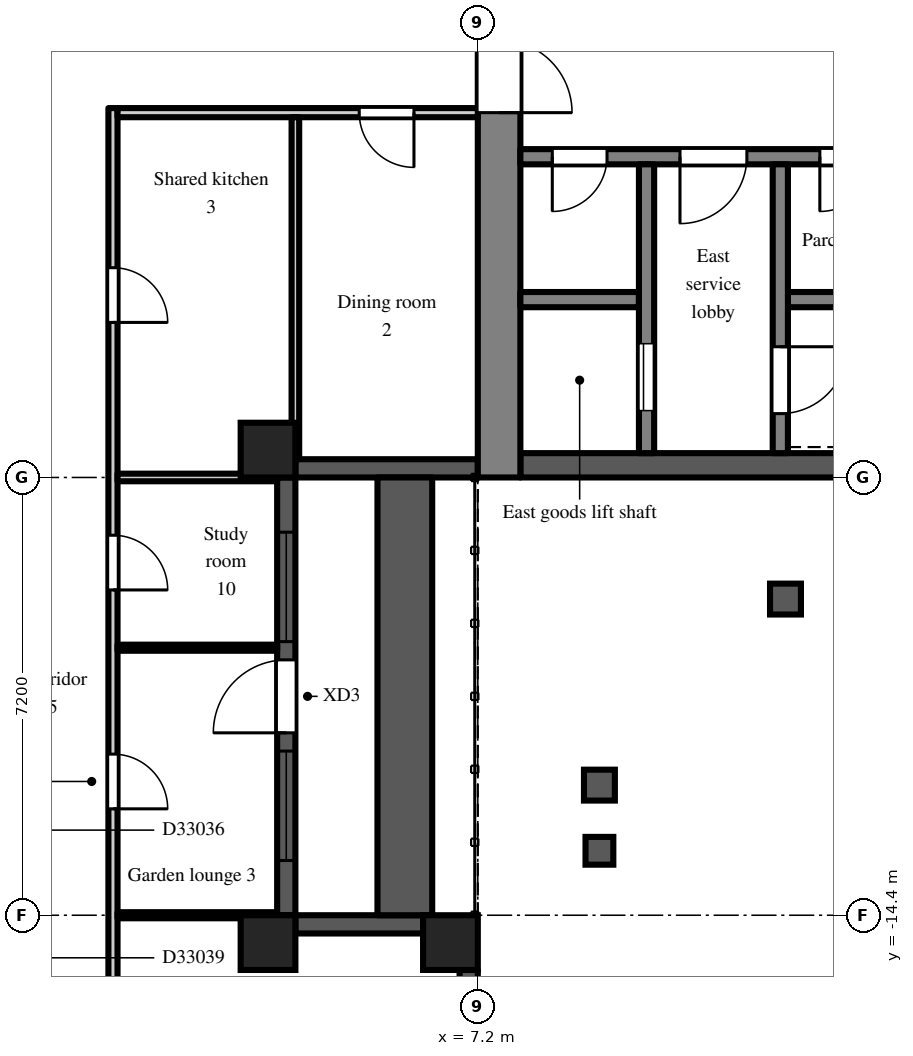
"""IFC4 building model, lengths in metres.
Left out: names, types, materials, properties, quantities, classifications, styles, units other than length and angle.
Written with IfcOpenShell. Run it as: python <this file> out.ifc"""

import sys

from ifc_helpers import new_model, si_unit, direction, frame, frame_2d, origin, origin_2d, place, context, subcontext, project, spatial, rectangle, extrude, element, fill, save


model = new_model("IFC4")
c1 = context("Model", 3, precision=1e-05, world=origin(), true_north=direction((0.0, 1.0)))
c2 = subcontext(c1, "Body", "Model", "MODEL_VIEW")
j1 = project(units=[si_unit("LENGTHUNIT", "METRE"), si_unit("PLANEANGLEUNIT", "RADIAN")], contexts=[c1])
p1 = place(None, origin())
s1 = spatial("IfcSite", under=j1, at=p1, CompositionType="ELEMENT")
p2 = place(p1, origin())
s2 = spatial("IfcBuilding", under=s1, at=p2, CompositionType="ELEMENT")
p3 = place(p2, frame((0.0, 0.0, 231.9)))
s3 = spatial("IfcBuildingStorey", under=s2, at=p3, CompositionType="ELEMENT", Elevation=231.9)
for number, where, z_axis, x_axis in (
    (1, (3.75, -14.85, 0.0), (0.0, 0.0, 1.0), (1.0, 0.0, 0.0)),
    (2, (3.75, -6.75, 0.0), (0.0, 0.0, 1.0), (1.0, 0.0, 0.0)),
    (3, (6.75, -14.85, 0.0), (0.0, 0.0, 1.0), (1.0, 0.0, 0.0)),
):
    element("IfcColumn", number, at=place(p3, frame(where, z_axis=z_axis, x_axis=x_axis)), inside=s3, PredefinedType="COLUMN", context=c2, shape_type="SweptSolid", body=[
        extrude(rectangle(XDim=0.9, YDim=0.9, at=origin_2d()), origin(), (0.0, 0.0, 1.0), 3.0),
    ])
p4 = place(p3, frame((7.05, -17.1, 0.0), z_axis=(0.0, 0.0, 1.0), x_axis=(0.0, 1.0, 0.0)))
e4 = element("IfcWall", 4, at=p4, inside=s3, PredefinedType="SOLIDWALL", context=c2, shape_type="SweptSolid", body=[
    extrude(rectangle(XDim=1.8, YDim=0.3, at=frame_2d((0.9, 0.0))), origin(), (0.0, 0.0, 1.0), 2.3),
])
p5 = place(p4, frame((0.3, 0.0, 0.2)))
e5 = element("IfcOpeningElement", 5, at=p5, cuts=e4, PredefinedType="OPENING", context=c2, shape_type="SweptSolid", body=[
    extrude(rectangle(XDim=1.2, YDim=1.85, at=frame_2d((0.6, 0.925))), frame((0.0, 0.16, 0.0), z_axis=(0.0, -1.0, 0.0), x_axis=(1.0, 0.0, 0.0)), (0.0, 0.0, 1.0), 0.32),
])
p6 = place(p3, frame((6.3, -14.55, 0.0), z_axis=(0.0, 0.0, 1.0), x_axis=(-1.0, 0.0, 0.0)))
e6 = element("IfcWall", 6, at=p6, inside=s3, PredefinedType="SOLIDWALL", context=c2, shape_type="SweptSolid", body=[
    extrude(rectangle(XDim=2.1, YDim=0.3, at=frame_2d((1.05, 0.0))), origin(), (0.0, 0.0, 1.0), 2.3),
])
p7 = place(p3, frame((4.05, -14.4, 0.0), z_axis=(0.0, 0.0, 1.0), x_axis=(0.0, 1.0, 0.0)))
e7 = element("IfcWall", 7, at=p7, inside=s3, PredefinedType="SOLIDWALL", context=c2, shape_type="SweptSolid", body=[
    extrude(rectangle(XDim=7.2, YDim=0.3, at=frame_2d((3.6, 0.0))), origin(), (0.0, 0.0, 1.0), 2.3),
])
p8 = place(p7, frame((3.0, 0.0, 0.0)))
e8 = element("IfcOpeningElement", 8, at=p8, cuts=e7, PredefinedType="OPENING", context=c2, shape_type="SweptSolid", body=[
    extrude(rectangle(XDim=1.2, YDim=2.05, at=frame_2d((0.6, 1.025))), frame((0.0, 0.16, 0.0), z_axis=(0.0, -1.0, 0.0), x_axis=(1.0, 0.0, 0.0)), (0.0, 0.0, 1.0), 0.32),
])
p9 = place(p7, frame((0.9, 0.0, 0.2)))
e9 = element("IfcOpeningElement", 9, at=p9, cuts=e7, PredefinedType="OPENING", context=c2, shape_type="SweptSolid", body=[
    extrude(rectangle(XDim=1.8, YDim=1.85, at=frame_2d((0.9, 0.925))), frame((0.0, 0.16, 0.0), z_axis=(0.0, -1.0, 0.0), x_axis=(1.0, 0.0, 0.0)), (0.0, 0.0, 1.0), 0.32),
])
p10 = place(p7, frame((4.5, 0.0, 0.2)))
e10 = element("IfcOpeningElement", 10, at=p10, cuts=e7, PredefinedType="OPENING", context=c2, shape_type="SweptSolid", body=[
    extrude(rectangle(XDim=1.8, YDim=1.85, at=frame_2d((0.9, 0.925))), frame((0.0, 0.16, 0.0), z_axis=(0.0, -1.0, 0.0), x_axis=(1.0, 0.0, 0.0)), (0.0, 0.0, 1.0), 0.32),
])
p11 = place(p3, frame((4.2, -7.05, 0.0), z_axis=(0.0, 0.0, 1.0), x_axis=(1.0, 0.0, 0.0)))
e11 = element("IfcWall", 11, at=p11, inside=s3, PredefinedType="SOLIDWALL", context=c2, shape_type="SweptSolid", body=[
    extrude(rectangle(XDim=3.0, YDim=0.3, at=frame_2d((1.5, 0.0))), origin(), (0.0, 0.0, 1.0), 2.3),
])
p12 = place(p3, frame((6.0, -14.4, 0.0), z_axis=(0.0, 0.0, 1.0), x_axis=(0.0, 1.0, 0.0)))
e12 = element("IfcWall", 12, at=p12, inside=s3, PredefinedType="PARAPET", context=c2, shape_type="SweptSolid", body=[
    extrude(rectangle(XDim=7.2, YDim=0.9, at=frame_2d((3.6, 0.0))), origin(), (0.0, 0.0, 1.0), 0.8),
])
p13 = place(p3, frame((7.55, -7.2, 0.0), z_axis=(0.0, 0.0, 1.0), x_axis=(0.0, 1.0, 0.0)))
e13 = element("IfcWall", 13, at=p13, inside=s3, PredefinedType="SHEAR", context=c2, shape_type="SweptSolid", body=[
    extrude(rectangle(XDim=14.4, YDim=0.7, at=frame_2d((7.2, 0.0))), origin(), (0.0, 0.0, 1.0), 2.6),
])
p14 = place(p13, frame((6.0, 0.0, 0.0)))
e14 = element("IfcOpeningElement", 14, at=p14, cuts=e13, PredefinedType="OPENING", context=c2, shape_type="SweptSolid", body=[
    extrude(rectangle(XDim=2.4, YDim=2.2, at=frame_2d((1.2, 1.1))), frame((0.0, 0.36, 0.0), z_axis=(0.0, -1.0, 0.0), x_axis=(1.0, 0.0, 0.0)), (0.0, 0.0, 1.0), 0.72),
])
p15 = place(p3, frame((7.9, -7.0, 0.0), z_axis=(0.0, 0.0, 1.0), x_axis=(1.0, 0.0, 0.0)))
e15 = element("IfcWall", 15, at=p15, inside=s3, PredefinedType="SHEAR", context=c2, shape_type="SweptSolid", body=[
    extrude(rectangle(XDim=12.95, YDim=0.4, at=frame_2d((6.475, 0.0))), origin(), (0.0, 0.0, 1.0), 2.6),
])
p16 = place(p3, frame((7.9, -1.925, 0.0), z_axis=(0.0, 0.0, 1.0), x_axis=(1.0, 0.0, 0.0)))
e16 = element("IfcWall", 16, at=p16, inside=s3, PredefinedType="SHEAR", context=c2, shape_type="SweptSolid", body=[
    extrude(rectangle(XDim=12.95, YDim=0.25, at=frame_2d((6.475, 0.0))), origin(), (0.0, 0.0, 1.0), 2.6),
])
p17 = place(p16, frame((0.525, 0.0, 0.0)))
e17 = element("IfcOpeningElement", 17, at=p17, cuts=e16, PredefinedType="OPENING", context=c2, shape_type="SweptSolid", body=[
    extrude(rectangle(XDim=0.9, YDim=2.1, at=frame_2d((0.45, 1.05))), frame((0.0, 0.135, 0.0), z_axis=(0.0, -1.0, 0.0), x_axis=(1.0, 0.0, 0.0)), (0.0, 0.0, 1.0), 0.27),
])
p18 = place(p16, frame((2.625, 0.0, 0.0)))
e18 = element("IfcOpeningElement", 18, at=p18, cuts=e16, PredefinedType="OPENING", context=c2, shape_type="SweptSolid", body=[
    extrude(rectangle(XDim=1.1, YDim=2.1, at=frame_2d((0.55, 1.05))), frame((0.0, 0.135, 0.0), z_axis=(0.0, -1.0, 0.0), x_axis=(1.0, 0.0, 0.0)), (0.0, 0.0, 1.0), 0.27),
])
p19 = place(p16, frame((4.925, 0.0, 0.0)))
e19 = element("IfcOpeningElement", 19, at=p19, cuts=e16, PredefinedType="OPENING", context=c2, shape_type="SweptSolid", body=[
    extrude(rectangle(XDim=0.9, YDim=2.1, at=frame_2d((0.45, 1.05))), frame((0.0, 0.135, 0.0), z_axis=(0.0, -1.0, 0.0), x_axis=(1.0, 0.0, 0.0)), (0.0, 0.0, 1.0), 0.27),
])
p20 = place(p16, frame((8.225, 0.0, 0.0)))
e20 = element("IfcOpeningElement", 20, at=p20, cuts=e16, PredefinedType="OPENING", context=c2, shape_type="SweptSolid", body=[
    extrude(rectangle(XDim=0.9, YDim=2.1, at=frame_2d((0.45, 1.05))), frame((0.0, 0.135, 0.0), z_axis=(0.0, -1.0, 0.0), x_axis=(1.0, 0.0, 0.0)), (0.0, 0.0, 1.0), 0.27),
])
p21 = place(p16, frame((11.525, 0.0, 0.0)))
e21 = element("IfcOpeningElement", 21, at=p21, cuts=e16, PredefinedType="OPENING", context=c2, shape_type="SweptSolid", body=[
    extrude(rectangle(XDim=0.9, YDim=2.1, at=frame_2d((0.45, 1.05))), frame((0.0, 0.135, 0.0), z_axis=(0.0, -1.0, 0.0), x_axis=(1.0, 0.0, 0.0)), (0.0, 0.0, 1.0), 0.27),
])
p22 = place(p3, frame((7.9, -4.275, 0.0), z_axis=(0.0, 0.0, 1.0), x_axis=(1.0, 0.0, 0.0)))
e22 = element("IfcWall", 22, at=p22, inside=s3, PredefinedType="SHEAR", context=c2, shape_type="SweptSolid", body=[
    extrude(rectangle(XDim=1.95, YDim=0.25, at=frame_2d((0.975, 0.0))), origin(), (0.0, 0.0, 1.0), 2.6),
])
p23 = place(p3, frame((12.3, -4.275, 0.0), z_axis=(0.0, 0.0, 1.0), x_axis=(1.0, 0.0, 0.0)))
e23 = element("IfcWall", 23, at=p23, inside=s3, PredefinedType="SHEAR", context=c2, shape_type="SweptSolid", body=[
    extrude(rectangle(XDim=8.55, YDim=0.25, at=frame_2d((4.275, 0.0))), origin(), (0.0, 0.0, 1.0), 2.6),
])
p24 = place(p3, frame((9.975, -2.05, 0.0), z_axis=(0.0, 0.0, 1.0), x_axis=(0.0, -1.0, 0.0)))
e24 = element("IfcWall", 24, at=p24, inside=s3, PredefinedType="SHEAR", context=c2, shape_type="SweptSolid", body=[
    extrude(rectangle(XDim=4.75, YDim=0.25, at=frame_2d((2.375, 0.0))), origin(), (0.0, 0.0, 1.0), 2.6),
])
p25 = place(p24, frame((2.95, 0.0, 0.0)))
e25 = element("IfcOpeningElement", 25, at=p25, cuts=e24, PredefinedType="OPENING", context=c2, shape_type="SweptSolid", body=[
    extrude(rectangle(XDim=1.1, YDim=2.1, at=frame_2d((0.55, 1.05))), frame((0.0, 0.135, 0.0), z_axis=(0.0, -1.0, 0.0), x_axis=(1.0, 0.0, 0.0)), (0.0, 0.0, 1.0), 0.27),
])
p26 = place(p3, frame((12.175, -2.05, 0.0), z_axis=(0.0, 0.0, 1.0), x_axis=(0.0, -1.0, 0.0)))
e26 = element("IfcWall", 26, at=p26, inside=s3, PredefinedType="SHEAR", context=c2, shape_type="SweptSolid", body=[
    extrude(rectangle(XDim=4.75, YDim=0.25, at=frame_2d((2.375, 0.0))), origin(), (0.0, 0.0, 1.0), 2.6),
])
p27 = place(p26, frame((3.0, 0.0, 0.0)))
e27 = element("IfcOpeningElement", 27, at=p27, cuts=e26, PredefinedType="OPENING", context=c2, shape_type="SweptSolid", body=[
    extrude(rectangle(XDim=1.1, YDim=2.1, at=frame_2d((0.55, 1.05))), frame((0.0, 0.135, 0.0), z_axis=(0.0, -1.0, 0.0), x_axis=(1.0, 0.0, 0.0)), (0.0, 0.0, 1.0), 0.27),
])
p28 = place(p3, frame((1.2, -19.525, 0.0), z_axis=(0.0, 0.0, 1.0), x_axis=(0.0, 1.0, 0.0)))
e28 = element("IfcWall", 28, at=p28, inside=s3, PredefinedType="PARTITIONING", context=c2, shape_type="SweptSolid", body=[
    extrude(rectangle(XDim=18.4, YDim=0.15, at=frame_2d((9.2, 0.0))), origin(), (0.0, 0.0, 1.0), 2.6),
])
p29 = place(p28, frame((14.875, 0.0, 0.0)))
e29 = element("IfcOpeningElement", 29, at=p29, cuts=e28, PredefinedType="OPENING", context=c2, shape_type="SweptSolid", body=[
    extrude(rectangle(XDim=0.9, YDim=2.1, at=frame_2d((0.45, 1.05))), frame((0.0, 0.085, 0.0), z_axis=(0.0, -1.0, 0.0), x_axis=(1.0, 0.0, 0.0)), (0.0, 0.0, 1.0), 0.17),
])
p30 = place(p28, frame((10.475, 0.0, 0.0)))
e30 = element("IfcOpeningElement", 30, at=p30, cuts=e28, PredefinedType="OPENING", context=c2, shape_type="SweptSolid", body=[
    extrude(rectangle(XDim=0.9, YDim=2.1, at=frame_2d((0.45, 1.05))), frame((0.0, 0.085, 0.0), z_axis=(0.0, -1.0, 0.0), x_axis=(1.0, 0.0, 0.0)), (0.0, 0.0, 1.0), 0.17),
])
p31 = place(p28, frame((6.875, 0.0, 0.0)))
e31 = element("IfcOpeningElement", 31, at=p31, cuts=e28, PredefinedType="OPENING", context=c2, shape_type="SweptSolid", body=[
    extrude(rectangle(XDim=0.9, YDim=2.1, at=frame_2d((0.45, 1.05))), frame((0.0, 0.085, 0.0), z_axis=(0.0, -1.0, 0.0), x_axis=(1.0, 0.0, 0.0)), (0.0, 0.0, 1.0), 0.17),
])
p32 = place(p28, frame((1.625, 0.0, 0.0)))
e32 = element("IfcOpeningElement", 32, at=p32, cuts=e28, PredefinedType="OPENING", context=c2, shape_type="SweptSolid", body=[
    extrude(rectangle(XDim=1.8, YDim=2.1, at=frame_2d((0.9, 1.05))), frame((0.0, 0.085, 0.0), z_axis=(0.0, -1.0, 0.0), x_axis=(1.0, 0.0, 0.0)), (0.0, 0.0, 1.0), 0.17),
])
for number, where, z_axis, x_axis in (
    (33, (1.275, -14.4, 0.0), (0.0, 0.0, 1.0), (1.0, 0.0, 0.0)),
    (34, (1.275, -10.0, 0.0), (0.0, 0.0, 1.0), (1.0, 0.0, 0.0)),
):
    element("IfcWall", number, at=place(p3, frame(where, z_axis=z_axis, x_axis=x_axis)), inside=s3, PredefinedType="PARTITIONING", context=c2, shape_type="SweptSolid", body=[
        extrude(rectangle(XDim=2.625, YDim=0.1, at=frame_2d((1.312, 0.0))), origin(), (0.0, 0.0, 1.0), 2.6),
    ])
p33 = place(p3, frame((1.275, -7.2, 0.0), z_axis=(0.0, 0.0, 1.0), x_axis=(1.0, 0.0, 0.0)))
e35 = element("IfcWall", 35, at=p33, inside=s3, PredefinedType="PARTITIONING", context=c2, shape_type="SweptSolid", body=[
    extrude(rectangle(XDim=2.625, YDim=0.125, at=frame_2d((1.312, 0.0))), origin(), (0.0, 0.0, 1.0), 2.6),
])
p34 = place(p3, frame((1.275, -1.2, 0.0), z_axis=(0.0, 0.0, 1.0), x_axis=(1.0, 0.0, 0.0)))
e36 = element("IfcWall", 36, at=p34, inside=s3, PredefinedType="PARTITIONING", context=c2, shape_type="SweptSolid", body=[
    extrude(rectangle(XDim=5.925, YDim=0.15, at=frame_2d((2.962, 0.0))), origin(), (0.0, 0.0, 1.0), 2.6),
])
p35 = place(p34, frame((3.975, 0.0, 0.0)))
e37 = element("IfcOpeningElement", 37, at=p35, cuts=e36, PredefinedType="OPENING", context=c2, shape_type="SweptSolid", body=[
    extrude(rectangle(XDim=0.9, YDim=2.1, at=frame_2d((0.45, 1.05))), frame((0.0, 0.085, 0.0), z_axis=(0.0, -1.0, 0.0), x_axis=(1.0, 0.0, 0.0)), (0.0, 0.0, 1.0), 0.17),
])
p36 = place(p3, frame((4.2, -6.9, 0.0), z_axis=(0.0, 0.0, 1.0), x_axis=(0.0, 1.0, 0.0)))
e38 = element("IfcWall", 38, at=p36, inside=s3, PredefinedType="PARTITIONING", context=c2, shape_type="SweptSolid", body=[
    extrude(rectangle(XDim=5.625, YDim=0.125, at=frame_2d((2.812, 0.0))), origin(), (0.0, 0.0, 1.0), 2.6),
])
p37 = place(p8, origin())
e39 = element("IfcDoor", 39, at=p37, inside=s3, OperationType="SINGLE_SWING_LEFT", PredefinedType="DOOR", context=c2, shape_type="SweptSolid", body=[
    extrude(rectangle(XDim=1.2, YDim=2.05, at=frame_2d((0.6, 1.025))), frame((0.0, 0.025, 0.0), z_axis=(0.0, -1.0, 0.0), x_axis=(1.0, 0.0, 0.0)), (0.0, 0.0, 1.0), 0.05),
])
fill(e8, e39)
p38 = place(p9, origin())
e40 = element("IfcWindow", 40, at=p38, inside=s3, PartitioningType="SINGLE_PANEL", PredefinedType="WINDOW", context=c2, shape_type="SweptSolid", body=[
    extrude(rectangle(XDim=1.8, YDim=1.85, at=frame_2d((0.9, 0.925))), frame((0.0, 0.03, 0.0), z_axis=(0.0, -1.0, 0.0), x_axis=(1.0, 0.0, 0.0)), (0.0, 0.0, 1.0), 0.06),
])
fill(e9, e40)
p39 = place(p10, origin())
e41 = element("IfcWindow", 41, at=p39, inside=s3, PartitioningType="SINGLE_PANEL", PredefinedType="WINDOW", context=c2, shape_type="SweptSolid", body=[
    extrude(rectangle(XDim=1.8, YDim=1.85, at=frame_2d((0.9, 0.925))), frame((0.0, 0.03, 0.0), z_axis=(0.0, -1.0, 0.0), x_axis=(1.0, 0.0, 0.0)), (0.0, 0.0, 1.0), 0.06),
])
fill(e10, e41)
p40 = place(p25, origin())
e42 = element("IfcDoor", 42, at=p40, inside=s3, OperationType="SLIDING_TO_LEFT", PredefinedType="DOOR", context=c2, shape_type="SweptSolid", body=[
    extrude(rectangle(XDim=1.1, YDim=2.1, at=frame_2d((0.55, 1.05))), frame((0.0, 0.025, 0.0), z_axis=(0.0, -1.0, 0.0), x_axis=(1.0, 0.0, 0.0)), (0.0, 0.0, 1.0), 0.05),
])
fill(e25, e42)
p41 = place(p27, origin())
e43 = element("IfcDoor", 43, at=p41, inside=s3, OperationType="SINGLE_SWING_LEFT", PredefinedType="DOOR", context=c2, shape_type="SweptSolid", body=[
    extrude(rectangle(XDim=1.1, YDim=2.1, at=frame_2d((0.55, 1.05))), frame((0.0, 0.025, 0.0), z_axis=(0.0, -1.0, 0.0), x_axis=(1.0, 0.0, 0.0)), (0.0, 0.0, 1.0), 0.05),
])
fill(e27, e43)
p42 = place(p17, frame((0.9, 0.0, 0.0), z_axis=(0.0, 0.0, 1.0), x_axis=(-1.0, 0.0, 0.0)))
e44 = element("IfcDoor", 44, at=p42, inside=s3, OperationType="SINGLE_SWING_RIGHT", PredefinedType="DOOR", context=c2, shape_type="SweptSolid", body=[
    extrude(rectangle(XDim=0.9, YDim=2.1, at=frame_2d((0.45, 1.05))), frame((0.0, 0.025, 0.0), z_axis=(0.0, -1.0, 0.0), x_axis=(1.0, 0.0, 0.0)), (0.0, 0.0, 1.0), 0.05),
])
fill(e17, e44)
p43 = place(p18, frame((1.1, 0.0, 0.0), z_axis=(0.0, 0.0, 1.0), x_axis=(-1.0, 0.0, 0.0)))
e45 = element("IfcDoor", 45, at=p43, inside=s3, OperationType="SINGLE_SWING_RIGHT", PredefinedType="DOOR", context=c2, shape_type="SweptSolid", body=[
    extrude(rectangle(XDim=1.1, YDim=2.1, at=frame_2d((0.55, 1.05))), frame((0.0, 0.025, 0.0), z_axis=(0.0, -1.0, 0.0), x_axis=(1.0, 0.0, 0.0)), (0.0, 0.0, 1.0), 0.05),
])
fill(e18, e45)
p44 = place(p14, frame((2.4, 0.0, 0.0), z_axis=(0.0, 0.0, 1.0), x_axis=(-1.0, 0.0, 0.0)))
e46 = element("IfcDoor", 46, at=p44, inside=s3, OperationType="DOUBLE_DOOR_DOUBLE_SWING", PredefinedType="DOOR", context=c2, shape_type="SweptSolid", body=[
    extrude(rectangle(XDim=2.4, YDim=2.2, at=frame_2d((1.2, 1.1))), frame((0.0, 0.025, 0.0), z_axis=(0.0, -1.0, 0.0), x_axis=(1.0, 0.0, 0.0)), (0.0, 0.0, 1.0), 0.05),
])
fill(e14, e46)
p45 = place(p19, frame((0.9, 0.0, 0.0), z_axis=(0.0, 0.0, 1.0), x_axis=(-1.0, 0.0, 0.0)))
e47 = element("IfcDoor", 47, at=p45, inside=s3, OperationType="SINGLE_SWING_RIGHT", PredefinedType="DOOR", context=c2, shape_type="SweptSolid", body=[
    extrude(rectangle(XDim=0.9, YDim=2.1, at=frame_2d((0.45, 1.05))), frame((0.0, 0.025, 0.0), z_axis=(0.0, -1.0, 0.0), x_axis=(1.0, 0.0, 0.0)), (0.0, 0.0, 1.0), 0.05),
])
fill(e19, e47)
p46 = place(p29, frame((0.9, 0.0, 0.0), z_axis=(0.0, 0.0, 1.0), x_axis=(-1.0, 0.0, 0.0)))
e48 = element("IfcDoor", 48, at=p46, inside=s3, OperationType="SINGLE_SWING_RIGHT", PredefinedType="DOOR", context=c2, shape_type="SweptSolid", body=[
    extrude(rectangle(XDim=0.9, YDim=2.1, at=frame_2d((0.45, 1.05))), frame((0.0, 0.025, 0.0), z_axis=(0.0, -1.0, 0.0), x_axis=(1.0, 0.0, 0.0)), (0.0, 0.0, 1.0), 0.05),
])
fill(e29, e48)
p47 = place(p35, frame((0.9, 0.0, 0.0), z_axis=(0.0, 0.0, 1.0), x_axis=(-1.0, 0.0, 0.0)))
e49 = element("IfcDoor", 49, at=p47, inside=s3, OperationType="SINGLE_SWING_LEFT", PredefinedType="DOOR", context=c2, shape_type="SweptSolid", body=[
    extrude(rectangle(XDim=0.9, YDim=2.1, at=frame_2d((0.45, 1.05))), frame((0.0, 0.025, 0.0), z_axis=(0.0, -1.0, 0.0), x_axis=(1.0, 0.0, 0.0)), (0.0, 0.0, 1.0), 0.05),
])
fill(e37, e49)
p48 = place(p30, frame((0.9, 0.0, 0.0), z_axis=(0.0, 0.0, 1.0), x_axis=(-1.0, 0.0, 0.0)))
e50 = element("IfcDoor", 50, at=p48, inside=s3, OperationType="SINGLE_SWING_RIGHT", PredefinedType="DOOR", context=c2, shape_type="SweptSolid", body=[
    extrude(rectangle(XDim=0.9, YDim=2.1, at=frame_2d((0.45, 1.05))), frame((0.0, 0.025, 0.0), z_axis=(0.0, -1.0, 0.0), x_axis=(1.0, 0.0, 0.0)), (0.0, 0.0, 1.0), 0.05),
])
fill(e30, e50)
p49 = place(p31, frame((0.9, 0.0, 0.0), z_axis=(0.0, 0.0, 1.0), x_axis=(-1.0, 0.0, 0.0)))
e51 = element("IfcDoor", 51, at=p49, inside=s3, OperationType="SINGLE_SWING_RIGHT", PredefinedType="DOOR", context=c2, shape_type="SweptSolid", body=[
    extrude(rectangle(XDim=0.9, YDim=2.1, at=frame_2d((0.45, 1.05))), frame((0.0, 0.025, 0.0), z_axis=(0.0, -1.0, 0.0), x_axis=(1.0, 0.0, 0.0)), (0.0, 0.0, 1.0), 0.05),
])
fill(e31, e51)
save(model, sys.argv[1])
